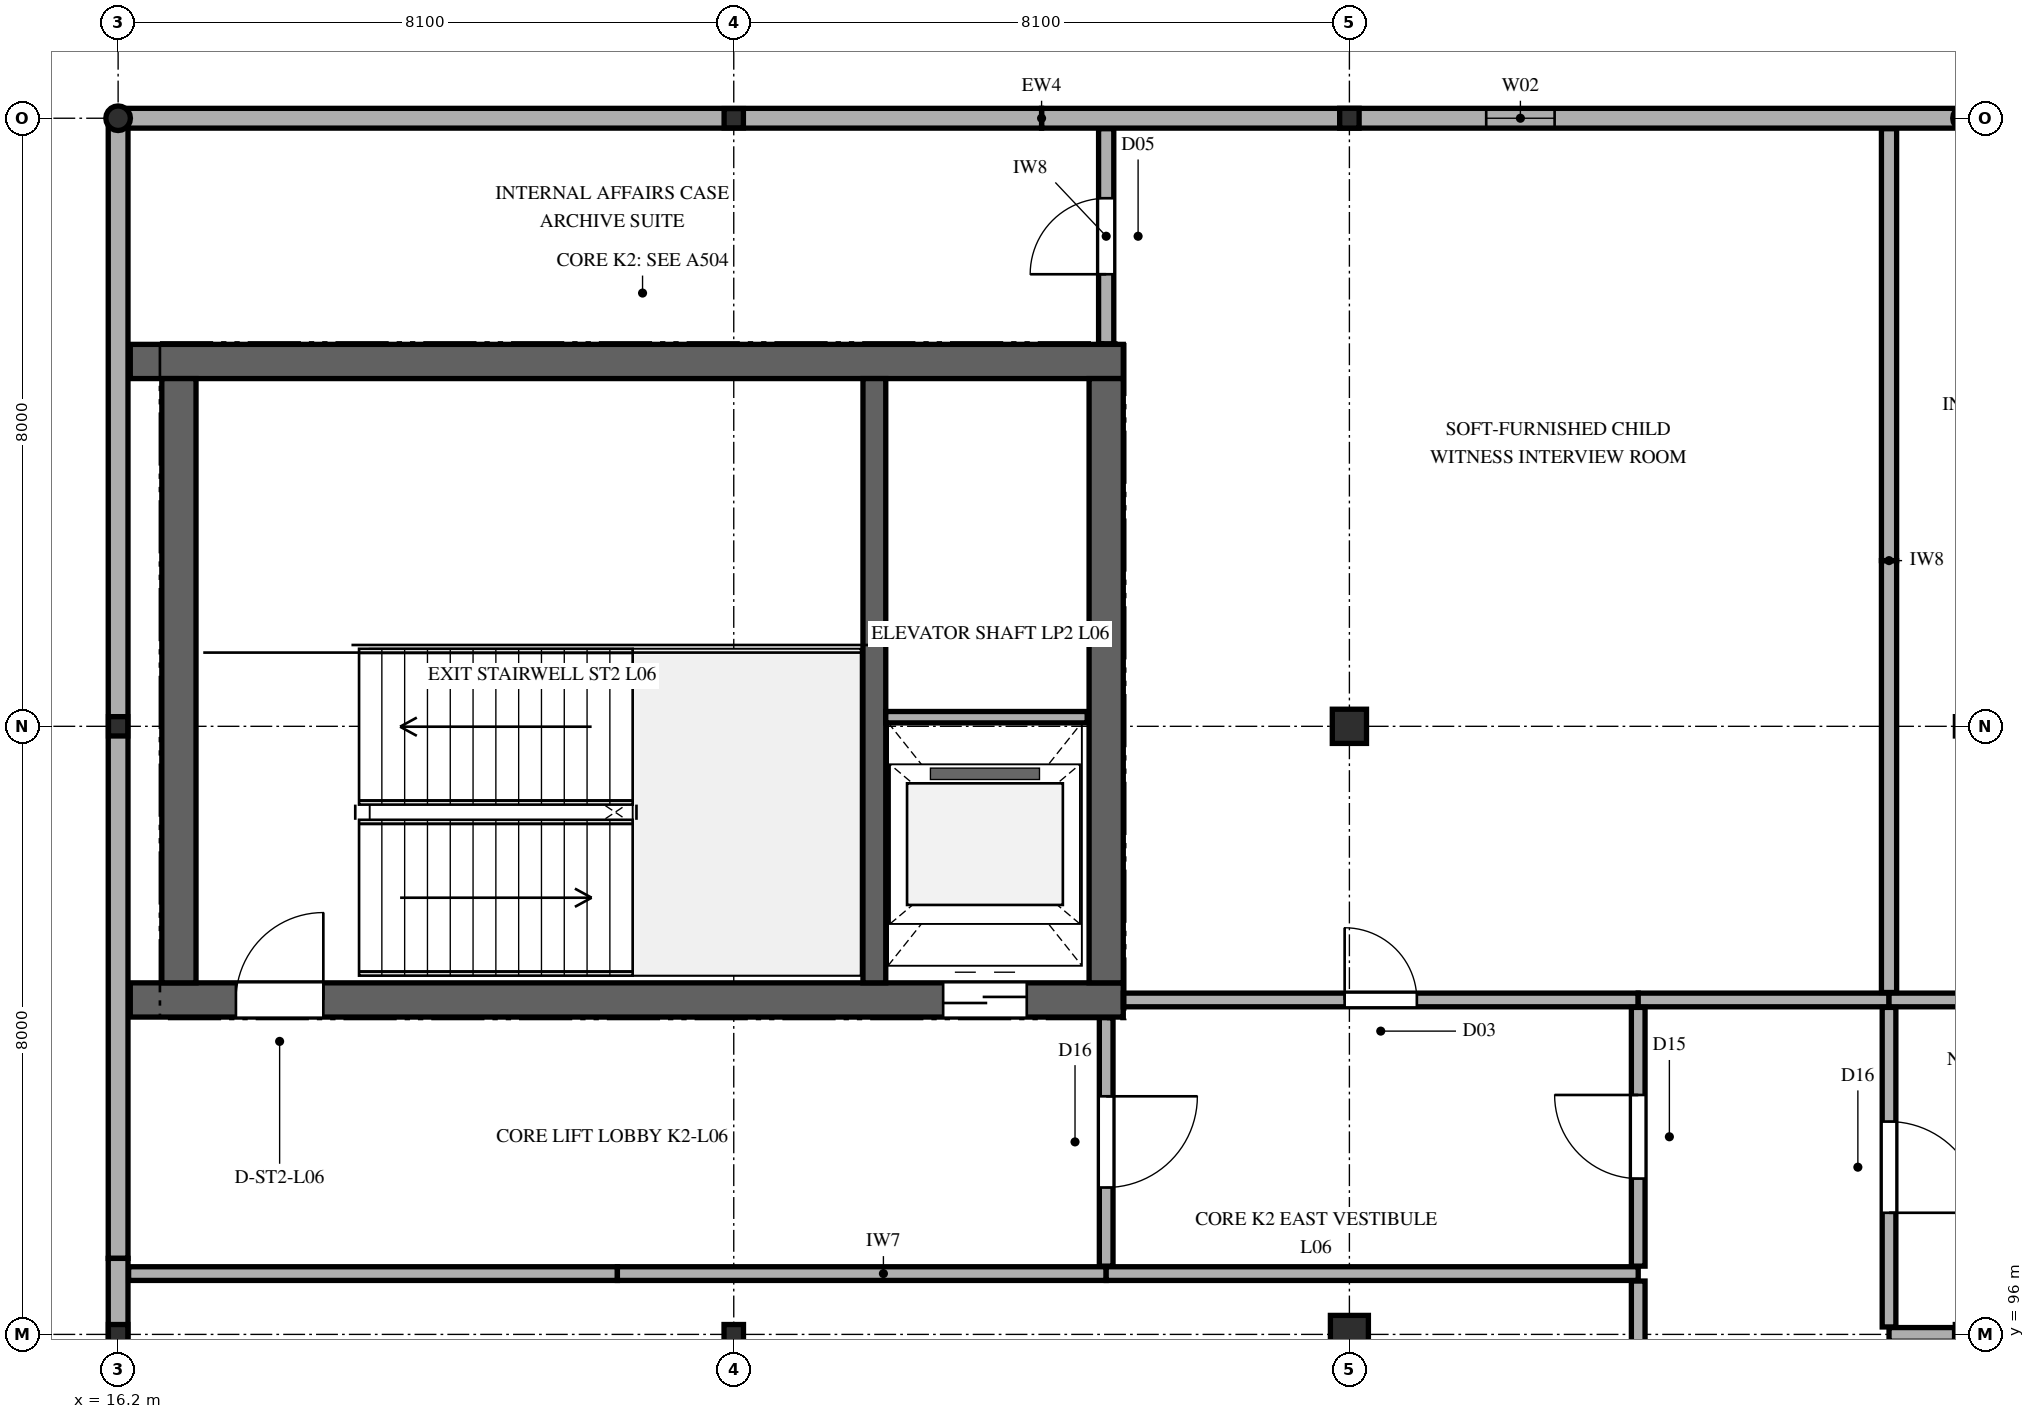
"""IFC4 building model, lengths in metres.
Left out: names, types, materials, properties, quantities, classifications, styles, units other than length and angle.
Written with IfcOpenShell. Run it as: python <this file> out.ifc"""

import sys

from ifc_helpers import new_model, si_unit, direction, frame, frame_2d, origin, origin_2d, place, context, subcontext, project, spatial, rectangle, hollow_rectangle, hollow_circle, i_section, extrude, element, fill, save


model = new_model("IFC4")
c1 = context("Model", 3, precision=1e-05, world=origin(), true_north=direction((0.0, 1.0)))
c2 = subcontext(c1, "Body", "Model", "MODEL_VIEW")
j1 = project(units=[si_unit("LENGTHUNIT", "METRE"), si_unit("PLANEANGLEUNIT", "RADIAN")], contexts=[c1])
p1 = place(None, origin())
s1 = spatial("IfcSite", under=j1, at=p1, CompositionType="ELEMENT")
p2 = place(p1, origin())
s2 = spatial("IfcBuilding", under=s1, at=p2, CompositionType="ELEMENT")
p3 = place(p2, frame((0.0, 0.0, 29.1)))
s3 = spatial("IfcBuildingStorey", under=s2, at=p3, CompositionType="ELEMENT", Elevation=29.1)
p4 = place(p3, frame((16.36, 100.4, 0.0), z_axis=(0.0, 0.0, 1.0), x_axis=(1.0, 0.0, 0.0)))
e1 = element("IfcWall", 1, at=p4, inside=s3, PredefinedType="SHEAR", context=c2, shape_type="SweptSolid", body=[
    extrude(rectangle(XDim=13.065, YDim=0.45, at=frame_2d((6.532, 0.0))), origin(), (0.0, 0.0, 1.0), 4.2),
])
p5 = place(p4, frame((1.39, 0.0, 0.0)))
e2 = element("IfcOpeningElement", 2, at=p5, cuts=e1, PredefinedType="OPENING", context=c2, shape_type="SweptSolid", body=[
    extrude(rectangle(XDim=1.15, YDim=2.25, at=frame_2d((0.575, 1.125))), frame((0.0, 0.235, 0.0), z_axis=(0.0, -1.0, 0.0), x_axis=(1.0, 0.0, 0.0)), (0.0, 0.0, 1.0), 0.47),
])
p6 = place(p4, frame((10.695, 0.0, 0.0)))
e3 = element("IfcOpeningElement", 3, at=p6, cuts=e1, PredefinedType="OPENING", context=c2, shape_type="SweptSolid", body=[
    extrude(rectangle(XDim=1.1, YDim=2.2, at=frame_2d((0.55, 1.1))), frame((0.0, 0.235, 0.0), z_axis=(0.0, -1.0, 0.0), x_axis=(1.0, 0.0, 0.0)), (0.0, 0.0, 1.0), 0.47),
])
p7 = place(p3, frame((16.36, 108.8, 0.0), z_axis=(0.0, 0.0, 1.0), x_axis=(1.0, 0.0, 0.0)))
e4 = element("IfcWall", 4, at=p7, inside=s3, PredefinedType="SHEAR", context=c2, shape_type="SweptSolid", body=[
    extrude(rectangle(XDim=13.065, YDim=0.45, at=frame_2d((6.532, 0.0))), origin(), (0.0, 0.0, 1.0), 4.2),
])
for number, where, z_axis, x_axis in (
    (5, (17.0, 100.625, 0.0), (0.0, 0.0, 1.0), (0.0, 1.0, 0.0)),
    (6, (29.2, 100.625, 0.0), (0.0, 0.0, 1.0), (0.0, 1.0, 0.0)),
):
    element("IfcWall", number, at=place(p3, frame(where, z_axis=z_axis, x_axis=x_axis)), inside=s3, PredefinedType="SHEAR", context=c2, shape_type="SweptSolid", body=[
        extrude(rectangle(XDim=7.95, YDim=0.45, at=frame_2d((3.975, 0.0))), origin(), (0.0, 0.0, 1.0), 4.2),
    ])
p8 = place(p3, frame((26.15, 100.625, 0.0), z_axis=(0.0, 0.0, 1.0), x_axis=(0.0, 1.0, 0.0)))
e7 = element("IfcWall", 7, at=p8, inside=s3, PredefinedType="SHEAR", context=c2, shape_type="SweptSolid", body=[
    extrude(rectangle(XDim=7.95, YDim=0.3, at=frame_2d((3.975, 0.0))), origin(), (0.0, 0.0, 1.0), 4.2),
])
p9 = place(p3, frame((16.2, 96.0, 0.0), z_axis=(0.0, 0.0, 1.0), x_axis=(1.0, 0.0, 0.0)))
e8 = element("IfcColumn", 8, at=p9, inside=s3, PredefinedType="COLUMN", context=c2, shape_type="SweptSolid", body=[
    extrude(i_section(OverallWidth=0.256, OverallDepth=0.26, WebThickness=0.011, FlangeThickness=0.017, FilletRadius=0.013, at=origin_2d()), origin(), (0.0, 0.0, 1.0), 4.2),
])
p10 = place(p3, frame((16.2, 104.0, 0.0), z_axis=(0.0, 0.0, 1.0), x_axis=(1.0, 0.0, 0.0)))
e9 = element("IfcColumn", 9, at=p10, inside=s3, PredefinedType="COLUMN", context=c2, shape_type="SweptSolid", body=[
    extrude(hollow_rectangle(XDim=0.254, YDim=0.254, WallThickness=0.013, InnerFilletRadius=0.013, OuterFilletRadius=0.025, at=origin_2d()), origin(), (0.0, 0.0, 1.0), 4.2),
])
p11 = place(p3, frame((16.2, 112.0, 0.0), z_axis=(0.0, 0.0, 1.0), x_axis=(1.0, 0.0, 0.0)))
e10 = element("IfcColumn", 10, at=p11, inside=s3, PredefinedType="COLUMN", context=c2, shape_type="SweptSolid", body=[
    extrude(hollow_circle(Radius=0.162, WallThickness=0.013, at=origin_2d()), origin(), (0.0, 0.0, 1.0), 4.2),
])
p12 = place(p3, frame((24.3, 96.0, 0.0), z_axis=(0.0, 0.0, 1.0), x_axis=(1.0, 0.0, 0.0)))
e11 = element("IfcColumn", 11, at=p12, inside=s3, PredefinedType="COLUMN", context=c2, shape_type="SweptSolid", body=[
    extrude(i_section(OverallWidth=0.256, OverallDepth=0.26, WebThickness=0.011, FlangeThickness=0.017, FilletRadius=0.013, at=origin_2d()), origin(), (0.0, 0.0, 1.0), 4.2),
])
p13 = place(p3, frame((24.3, 112.0, 0.0), z_axis=(0.0, 0.0, 1.0), x_axis=(1.0, 0.0, 0.0)))
e12 = element("IfcColumn", 12, at=p13, inside=s3, PredefinedType="COLUMN", context=c2, shape_type="SweptSolid", body=[
    extrude(hollow_rectangle(XDim=0.254, YDim=0.254, WallThickness=0.013, InnerFilletRadius=0.013, OuterFilletRadius=0.025, at=origin_2d()), origin(), (0.0, 0.0, 1.0), 4.2),
])
p14 = place(p3, frame((32.4, 96.0, 0.0), z_axis=(0.0, 0.0, 1.0), x_axis=(1.0, 0.0, 0.0)))
e13 = element("IfcColumn", 13, at=p14, inside=s3, PredefinedType="COLUMN", context=c2, shape_type="SweptSolid", body=[
    extrude(rectangle(XDim=0.5, YDim=0.5, at=origin_2d()), origin(), (0.0, 0.0, 1.0), 4.2),
])
p15 = place(p3, frame((32.4, 104.0, 0.0), z_axis=(0.0, 0.0, 1.0), x_axis=(1.0, 0.0, 0.0)))
e14 = element("IfcColumn", 14, at=p15, inside=s3, PredefinedType="COLUMN", context=c2, shape_type="SweptSolid", body=[
    extrude(rectangle(XDim=0.45, YDim=0.45, at=origin_2d()), origin(), (0.0, 0.0, 1.0), 4.2),
])
p16 = place(p3, frame((32.4, 112.0, 0.0), z_axis=(0.0, 0.0, 1.0), x_axis=(1.0, 0.0, 0.0)))
e15 = element("IfcColumn", 15, at=p16, inside=s3, PredefinedType="COLUMN", context=c2, shape_type="SweptSolid", body=[
    extrude(i_section(OverallWidth=0.256, OverallDepth=0.26, WebThickness=0.011, FlangeThickness=0.017, FilletRadius=0.013, at=origin_2d()), origin(), (0.0, 0.0, 1.0), 4.2),
])
p17 = place(p3, frame((40.5, 112.0, 0.0), z_axis=(0.0, 0.0, 1.0), x_axis=(1.0, 0.0, 0.0)))
e16 = element("IfcColumn", 16, at=p17, inside=s3, PredefinedType="COLUMN", context=c2, shape_type="SweptSolid", body=[
    extrude(hollow_circle(Radius=0.162, WallThickness=0.013, at=origin_2d()), origin(), (0.0, 0.0, 1.0), 4.2),
])
p18 = place(p3, frame((40.5, 112.0, 0.0), z_axis=(0.0, 0.0, 1.0), x_axis=(-1.0, 0.0, 0.0)))
e17 = element("IfcWall", 17, at=p18, inside=s3, PredefinedType="SOLIDWALL", context=c2, shape_type="SweptSolid", body=[
    extrude(rectangle(XDim=12.15, YDim=0.26, at=frame_2d((6.075, 0.0))), origin(), (0.0, 0.0, 1.0), 3.402),
])
p19 = place(p18, frame((5.4, 0.0, 0.85)))
e18 = element("IfcOpeningElement", 18, at=p19, cuts=e17, PredefinedType="OPENING", context=c2, shape_type="SweptSolid", body=[
    extrude(rectangle(XDim=0.9, YDim=2.1, at=frame_2d((0.45, 1.05))), frame((0.0, 0.14, 0.0), z_axis=(0.0, -1.0, 0.0), x_axis=(1.0, 0.0, 0.0)), (0.0, 0.0, 1.0), 0.28),
])
p20 = place(p3, frame((28.35, 112.0, 0.0), z_axis=(0.0, 0.0, 1.0), x_axis=(-1.0, 0.0, 0.0)))
e19 = element("IfcWall", 19, at=p20, inside=s3, PredefinedType="SOLIDWALL", context=c2, shape_type="SweptSolid", body=[
    extrude(rectangle(XDim=12.15, YDim=0.26, at=frame_2d((6.075, 0.0))), origin(), (0.0, 0.0, 1.0), 3.402),
])
for number, where, z_axis, x_axis in (
    (20, (16.2, 112.0, 0.0), (0.0, 0.0, 1.0), (0.0, -1.0, 0.0)),
    (21, (16.2, 97.0, 0.0), (0.0, 0.0, 1.0), (0.0, -1.0, 0.0)),
):
    element("IfcWall", number, at=place(p3, frame(where, z_axis=z_axis, x_axis=x_axis)), inside=s3, PredefinedType="SOLIDWALL", context=c2, shape_type="SweptSolid", body=[
        extrude(rectangle(XDim=15.0, YDim=0.26, at=frame_2d((7.5, 0.0))), origin(), (0.0, 0.0, 1.0), 3.452),
    ])
p21 = place(p3, frame((26.3, 104.12, 0.0), z_axis=(0.0, 0.0, 1.0), x_axis=(1.0, 0.0, 0.0)))
e22 = element("IfcWall", 22, at=p21, inside=s3, PredefinedType="PARTITIONING", context=c2, shape_type="SweptSolid", body=[
    extrude(rectangle(XDim=2.65, YDim=0.15, at=frame_2d((1.325, 0.0))), origin(), (0.0, 0.0, 1.0), 3.96),
])
p22 = place(p3, frame((16.338, 96.8, 0.0), z_axis=(0.0, 0.0, 1.0), x_axis=(1.0, 0.0, 0.0)))
e23 = element("IfcWall", 23, at=p22, inside=s3, PredefinedType="PARTITIONING", context=c2, shape_type="SweptSolid", body=[
    extrude(rectangle(XDim=6.431, YDim=0.18, at=frame_2d((3.216, 0.0))), origin(), (0.0, 0.0, 1.0), 3.96),
])
p23 = place(p3, frame((22.769, 96.8, 0.0), z_axis=(0.0, 0.0, 1.0), x_axis=(1.0, 0.0, 0.0)))
e24 = element("IfcWall", 24, at=p23, inside=s3, PredefinedType="PARTITIONING", context=c2, shape_type="SweptSolid", body=[
    extrude(rectangle(XDim=6.431, YDim=0.18, at=frame_2d((3.215, 0.0))), origin(), (0.0, 0.0, 1.0), 3.96),
])
p24 = place(p3, frame((29.2, 96.8, 0.0), z_axis=(0.0, 0.0, 1.0), x_axis=(1.0, 0.0, 0.0)))
e25 = element("IfcWall", 25, at=p24, inside=s3, PredefinedType="PARTITIONING", context=c2, shape_type="SweptSolid", body=[
    extrude(rectangle(XDim=7.0, YDim=0.18, at=frame_2d((3.5, 0.0))), origin(), (0.0, 0.0, 1.0), 3.96),
])
p25 = place(p3, frame((29.425, 100.4, 0.0), z_axis=(0.0, 0.0, 1.0), x_axis=(1.0, 0.0, 0.0)))
e26 = element("IfcWall", 26, at=p25, inside=s3, PredefinedType="PARTITIONING", context=c2, shape_type="SweptSolid", body=[
    extrude(rectangle(XDim=6.775, YDim=0.18, at=frame_2d((3.387, 0.0))), origin(), (0.0, 0.0, 1.0), 3.96),
])
p26 = place(p25, frame((2.913, 0.0, 0.0)))
e27 = element("IfcOpeningElement", 27, at=p26, cuts=e26, PredefinedType="OPENING", context=c2, shape_type="SweptSolid", body=[
    extrude(rectangle(XDim=0.95, YDim=2.15, at=frame_2d((0.475, 1.075))), frame((0.0, 0.1, 0.0), z_axis=(0.0, -1.0, 0.0), x_axis=(1.0, 0.0, 0.0)), (0.0, 0.0, 1.0), 0.2),
])
p27 = place(p3, frame((36.2, 100.4, 0.0), z_axis=(0.0, 0.0, 1.0), x_axis=(1.0, 0.0, 0.0)))
e28 = element("IfcWall", 28, at=p27, inside=s3, PredefinedType="PARTITIONING", context=c2, shape_type="SweptSolid", body=[
    extrude(rectangle(XDim=3.3, YDim=0.18, at=frame_2d((1.65, 0.0))), origin(), (0.0, 0.0, 1.0), 3.96),
])
p28 = place(p3, frame((39.5, 96.0, 0.0), z_axis=(0.0, 0.0, 1.0), x_axis=(1.0, 0.0, 0.0)))
e29 = element("IfcWall", 29, at=p28, inside=s3, PredefinedType="PARTITIONING", context=c2, shape_type="SweptSolid", body=[
    extrude(rectangle(XDim=0.862, YDim=0.18, at=frame_2d((0.431, 0.0))), origin(), (0.0, 0.0, 1.0), 3.402),
])
p29 = place(p3, frame((39.5, 100.4, 0.0), z_axis=(0.0, 0.0, 1.0), x_axis=(1.0, 0.0, 0.0)))
e30 = element("IfcWall", 30, at=p29, inside=s3, PredefinedType="PARTITIONING", context=c2, shape_type="SweptSolid", body=[
    extrude(rectangle(XDim=4.1, YDim=0.18, at=frame_2d((2.05, 0.0))), origin(), (0.0, 0.0, 1.0), 3.96),
])
p30 = place(p3, frame((29.2, 96.898, 0.0), z_axis=(0.0, 0.0, 1.0), x_axis=(0.0, 1.0, 0.0)))
e31 = element("IfcWall", 31, at=p30, inside=s3, PredefinedType="PARTITIONING", context=c2, shape_type="SweptSolid", body=[
    extrude(rectangle(XDim=3.269, YDim=0.18, at=frame_2d((1.635, 0.0))), origin(), (0.0, 0.0, 1.0), 3.96),
])
p31 = place(p30, frame((1.034, 0.0, 0.0)))
e32 = element("IfcOpeningElement", 32, at=p31, cuts=e31, PredefinedType="OPENING", context=c2, shape_type="SweptSolid", body=[
    extrude(rectangle(XDim=1.2, YDim=2.2, at=frame_2d((0.6, 1.1))), frame((0.0, 0.1, 0.0), z_axis=(0.0, -1.0, 0.0), x_axis=(1.0, 0.0, 0.0)), (0.0, 0.0, 1.0), 0.2),
])
p32 = place(p3, frame((29.2, 109.033, 0.0), z_axis=(0.0, 0.0, 1.0), x_axis=(0.0, 1.0, 0.0)))
e33 = element("IfcWall", 33, at=p32, inside=s3, PredefinedType="PARTITIONING", context=c2, shape_type="SweptSolid", body=[
    extrude(rectangle(XDim=2.829, YDim=0.2, at=frame_2d((1.415, 0.0))), origin(), (0.0, 0.0, 1.0), 3.96),
])
p33 = place(p32, frame((0.915, 0.0, 0.0)))
e34 = element("IfcOpeningElement", 34, at=p33, cuts=e33, PredefinedType="OPENING", context=c2, shape_type="SweptSolid", body=[
    extrude(rectangle(XDim=1.0, YDim=2.2, at=frame_2d((0.5, 1.1))), frame((0.0, 0.11, 0.0), z_axis=(0.0, -1.0, 0.0), x_axis=(1.0, 0.0, 0.0)), (0.0, 0.0, 1.0), 0.22),
])
p34 = place(p3, frame((36.2, 89.608, 0.0), z_axis=(0.0, 0.0, 1.0), x_axis=(0.0, 1.0, 0.0)))
e35 = element("IfcWall", 35, at=p34, inside=s3, PredefinedType="PARTITIONING", context=c2, shape_type="SweptSolid", body=[
    extrude(rectangle(XDim=7.094, YDim=0.18, at=frame_2d((3.547, 0.0))), origin(), (0.0, 0.0, 1.0), 3.545),
])
p35 = place(p34, frame((3.047, 0.0, 0.0)))
e36 = element("IfcOpeningElement", 36, at=p35, cuts=e35, PredefinedType="OPENING", context=c2, shape_type="SweptSolid", body=[
    extrude(rectangle(XDim=1.0, YDim=2.2, at=frame_2d((0.5, 1.1))), frame((0.0, 0.1, 0.0), z_axis=(0.0, -1.0, 0.0), x_axis=(1.0, 0.0, 0.0)), (0.0, 0.0, 1.0), 0.2),
])
p36 = place(p3, frame((36.2, 96.898, 0.0), z_axis=(0.0, 0.0, 1.0), x_axis=(0.0, 1.0, 0.0)))
e37 = element("IfcWall", 37, at=p36, inside=s3, PredefinedType="PARTITIONING", context=c2, shape_type="SweptSolid", body=[
    extrude(rectangle(XDim=3.404, YDim=0.18, at=frame_2d((1.702, 0.0))), origin(), (0.0, 0.0, 1.0), 3.545),
])
p37 = place(p36, frame((1.152, 0.0, 0.0)))
e38 = element("IfcOpeningElement", 38, at=p37, cuts=e37, PredefinedType="OPENING", context=c2, shape_type="SweptSolid", body=[
    extrude(rectangle(XDim=1.1, YDim=2.2, at=frame_2d((0.55, 1.1))), frame((0.0, 0.1, 0.0), z_axis=(0.0, -1.0, 0.0), x_axis=(1.0, 0.0, 0.0)), (0.0, 0.0, 1.0), 0.2),
])
p38 = place(p3, frame((39.5, 96.098, 0.0), z_axis=(0.0, 0.0, 1.0), x_axis=(0.0, 1.0, 0.0)))
e39 = element("IfcWall", 39, at=p38, inside=s3, PredefinedType="PARTITIONING", context=c2, shape_type="SweptSolid", body=[
    extrude(rectangle(XDim=4.204, YDim=0.18, at=frame_2d((2.102, 0.0))), origin(), (0.0, 0.0, 1.0), 3.96),
])
p39 = place(p38, frame((1.502, 0.0, 0.0)))
e40 = element("IfcOpeningElement", 40, at=p39, cuts=e39, PredefinedType="OPENING", context=c2, shape_type="SweptSolid", body=[
    extrude(rectangle(XDim=1.2, YDim=2.2, at=frame_2d((0.6, 1.1))), frame((0.0, 0.1, 0.0), z_axis=(0.0, -1.0, 0.0), x_axis=(1.0, 0.0, 0.0)), (0.0, 0.0, 1.0), 0.2),
])
p40 = place(p3, frame((39.5, 100.498, 0.0), z_axis=(0.0, 0.0, 1.0), x_axis=(0.0, 1.0, 0.0)))
e41 = element("IfcWall", 41, at=p40, inside=s3, PredefinedType="PARTITIONING", context=c2, shape_type="SweptSolid", body=[
    extrude(rectangle(XDim=5.682, YDim=0.2, at=frame_2d((2.841, 0.0))), origin(), (0.0, 0.0, 1.0), 3.96),
])
p41 = place(p3, frame((39.5, 106.18, 0.0), z_axis=(0.0, 0.0, 1.0), x_axis=(0.0, 1.0, 0.0)))
e42 = element("IfcWall", 42, at=p41, inside=s3, PredefinedType="PARTITIONING", context=c2, shape_type="SweptSolid", body=[
    extrude(rectangle(XDim=5.682, YDim=0.2, at=frame_2d((2.841, 0.0))), origin(), (0.0, 0.0, 1.0), 3.96),
])
p42 = place(p19, origin())
e43 = element("IfcWindow", 43, at=p42, inside=s3, PartitioningType="SINGLE_PANEL", PredefinedType="WINDOW", context=c2, shape_type="SweptSolid", body=[
    extrude(rectangle(XDim=0.9, YDim=2.1, at=frame_2d((0.45, 1.05))), frame((0.0, 0.03, 0.0), z_axis=(0.0, -1.0, 0.0), x_axis=(1.0, 0.0, 0.0)), (0.0, 0.0, 1.0), 0.06),
])
fill(e18, e43)
p43 = place(p5, origin())
e44 = element("IfcDoor", 44, at=p43, inside=s3, OperationType="SINGLE_SWING_RIGHT", PredefinedType="DOOR", context=c2, shape_type="SweptSolid", body=[
    extrude(rectangle(XDim=1.15, YDim=2.25, at=frame_2d((0.575, 1.125))), frame((0.0, 0.025, 0.0), z_axis=(0.0, -1.0, 0.0), x_axis=(1.0, 0.0, 0.0)), (0.0, 0.0, 1.0), 0.05),
])
fill(e2, e44)
p44 = place(p6, frame((1.1, 0.0, 0.0), z_axis=(0.0, 0.0, 1.0), x_axis=(-1.0, 0.0, 0.0)))
e45 = element("IfcDoor", 45, at=p44, inside=s3, OperationType="DOUBLE_DOOR_SLIDING", PredefinedType="DOOR", context=c2, shape_type="SweptSolid", body=[
    extrude(rectangle(XDim=1.1, YDim=2.2, at=frame_2d((0.55, 1.1))), frame((0.0, 0.025, 0.0), z_axis=(0.0, -1.0, 0.0), x_axis=(1.0, 0.0, 0.0)), (0.0, 0.0, 1.0), 0.05),
])
fill(e3, e45)
p45 = place(p26, origin())
e46 = element("IfcDoor", 46, at=p45, inside=s3, OperationType="SINGLE_SWING_LEFT", PredefinedType="DOOR", context=c2, shape_type="SweptSolid", body=[
    extrude(rectangle(XDim=0.95, YDim=2.15, at=frame_2d((0.475, 1.075))), frame((0.0, 0.025, 0.0), z_axis=(0.0, -1.0, 0.0), x_axis=(1.0, 0.0, 0.0)), (0.0, 0.0, 1.0), 0.05),
])
fill(e27, e46)
p46 = place(p31, frame((1.2, 0.0, 0.0), z_axis=(0.0, 0.0, 1.0), x_axis=(-1.0, 0.0, 0.0)))
e47 = element("IfcDoor", 47, at=p46, inside=s3, OperationType="SINGLE_SWING_RIGHT", PredefinedType="DOOR", context=c2, shape_type="SweptSolid", body=[
    extrude(rectangle(XDim=1.2, YDim=2.2, at=frame_2d((0.6, 1.1))), frame((0.0, 0.025, 0.0), z_axis=(0.0, -1.0, 0.0), x_axis=(1.0, 0.0, 0.0)), (0.0, 0.0, 1.0), 0.05),
])
fill(e32, e47)
p47 = place(p33, origin())
e48 = element("IfcDoor", 48, at=p47, inside=s3, OperationType="SINGLE_SWING_LEFT", PredefinedType="DOOR", context=c2, shape_type="SweptSolid", body=[
    extrude(rectangle(XDim=1.0, YDim=2.2, at=frame_2d((0.5, 1.1))), frame((0.0, 0.025, 0.0), z_axis=(0.0, -1.0, 0.0), x_axis=(1.0, 0.0, 0.0)), (0.0, 0.0, 1.0), 0.05),
])
fill(e34, e48)
p48 = place(p37, origin())
e49 = element("IfcDoor", 49, at=p48, inside=s3, OperationType="SINGLE_SWING_RIGHT", PredefinedType="DOOR", context=c2, shape_type="SweptSolid", body=[
    extrude(rectangle(XDim=1.1, YDim=2.2, at=frame_2d((0.55, 1.1))), frame((0.0, 0.025, 0.0), z_axis=(0.0, -1.0, 0.0), x_axis=(1.0, 0.0, 0.0)), (0.0, 0.0, 1.0), 0.05),
])
fill(e38, e49)
p49 = place(p39, frame((1.2, 0.0, 0.0), z_axis=(0.0, 0.0, 1.0), x_axis=(-1.0, 0.0, 0.0)))
e50 = element("IfcDoor", 50, at=p49, inside=s3, OperationType="SINGLE_SWING_LEFT", PredefinedType="DOOR", context=c2, shape_type="SweptSolid", body=[
    extrude(rectangle(XDim=1.2, YDim=2.2, at=frame_2d((0.6, 1.1))), frame((0.0, 0.025, 0.0), z_axis=(0.0, -1.0, 0.0), x_axis=(1.0, 0.0, 0.0)), (0.0, 0.0, 1.0), 0.05),
])
fill(e40, e50)
save(model, sys.argv[1])
